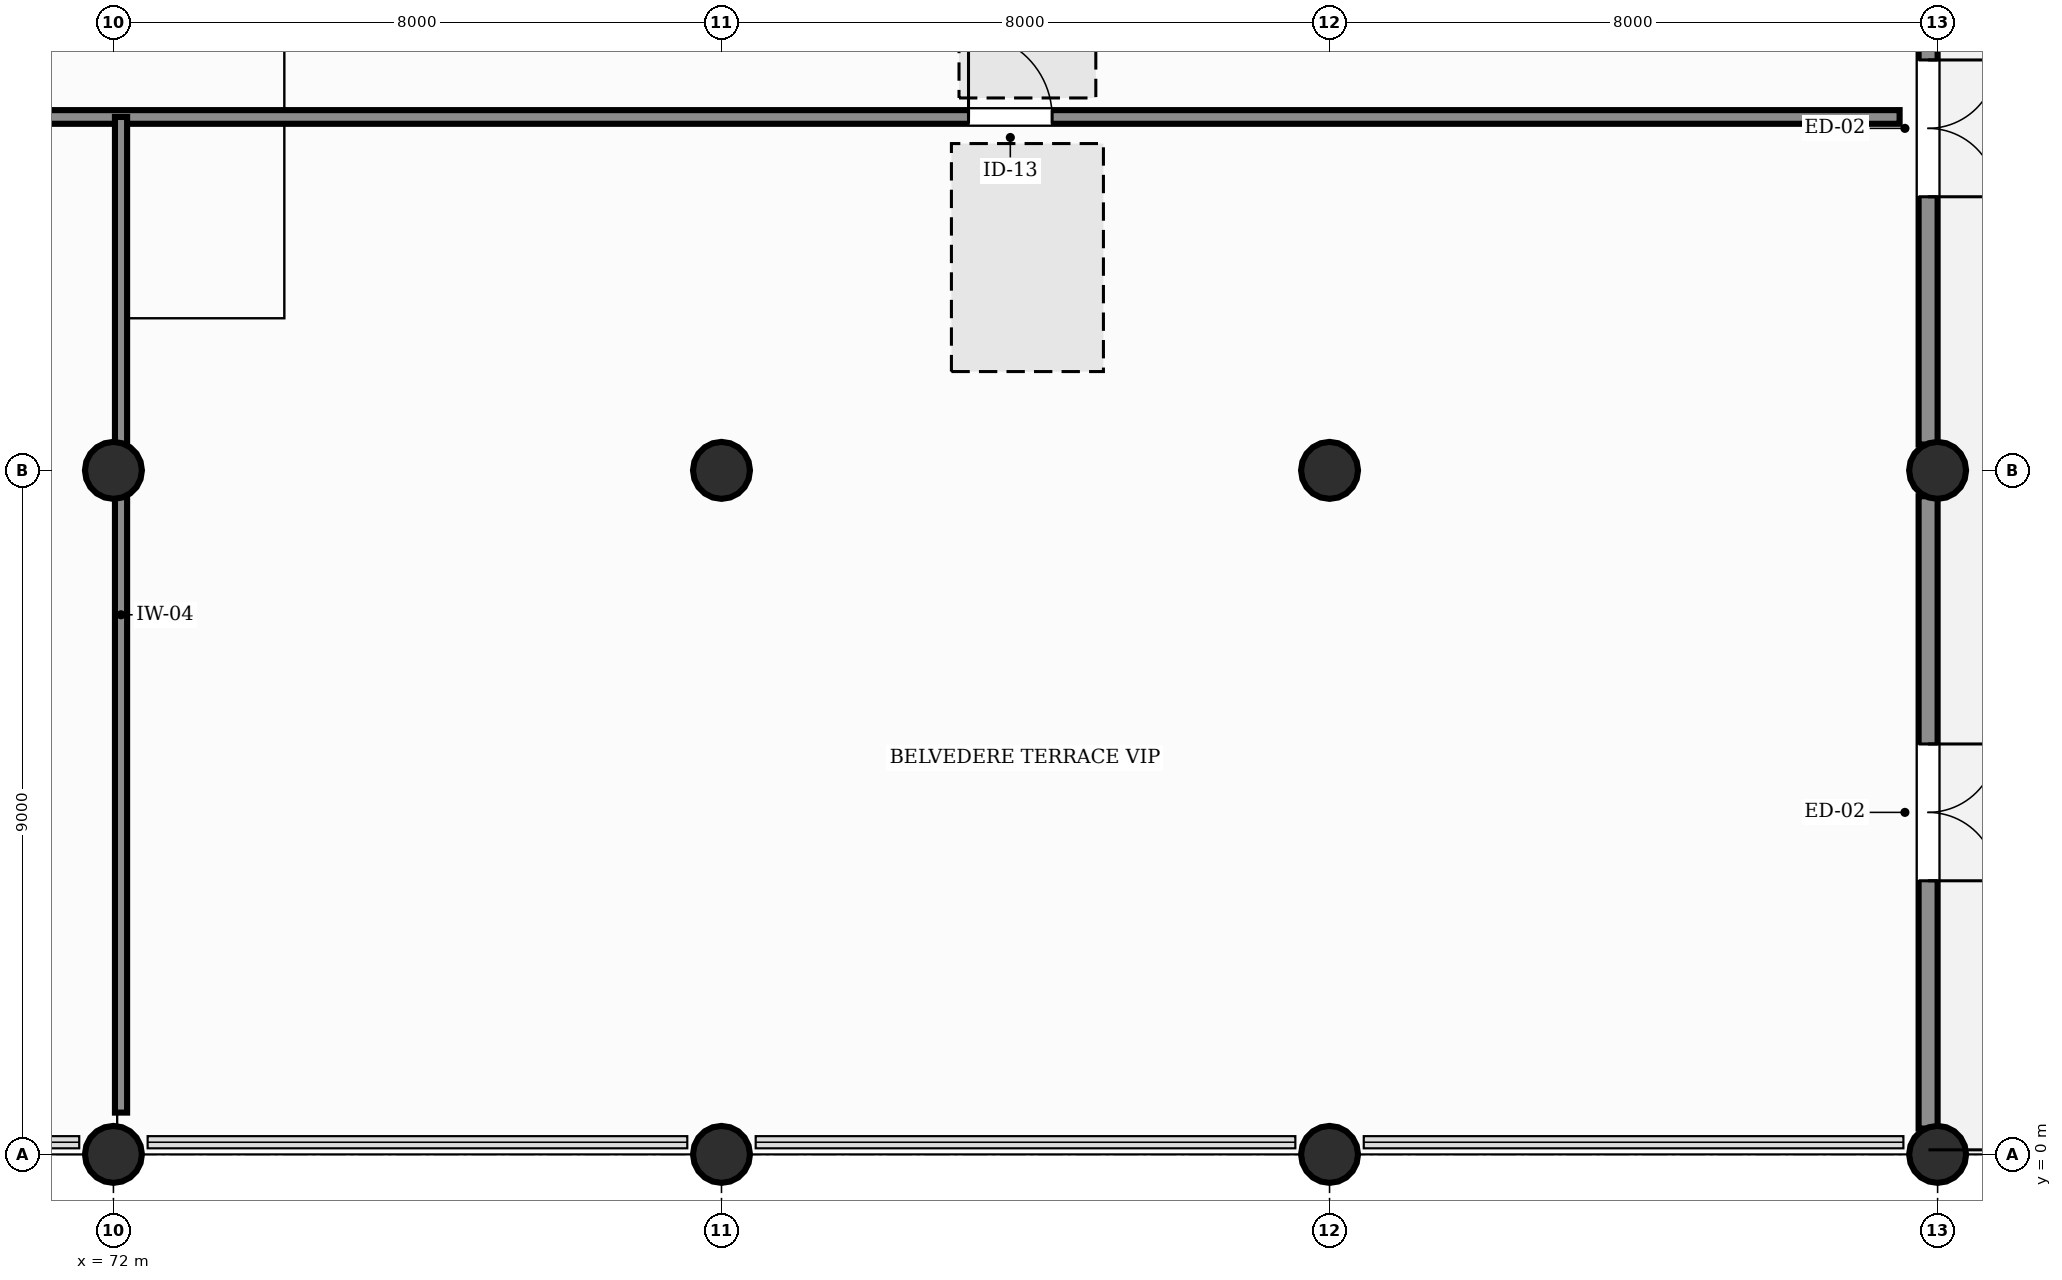
"""IFC4 building model, lengths in metres.
Left out: names, types, materials, properties, quantities, classifications, styles, units other than length and angle.
Written with IfcOpenShell. Run it as: python <this file> out.ifc"""

import sys

from ifc_helpers import new_model, si_unit, direction, frame, frame_2d, origin, origin_2d, place, context, subcontext, project, spatial, rectangle, circle, extrude, element, fill, save


model = new_model("IFC4")
c1 = context("Model", 3, precision=1e-05, world=origin(), true_north=direction((0.0, 1.0)))
c2 = subcontext(c1, "Body", "Model", "MODEL_VIEW")
j1 = project(units=[si_unit("LENGTHUNIT", "METRE"), si_unit("PLANEANGLEUNIT", "RADIAN")], contexts=[c1])
p1 = place(None, origin())
s1 = spatial("IfcSite", under=j1, at=p1, CompositionType="ELEMENT")
p2 = place(p1, origin())
s2 = spatial("IfcBuilding", under=s1, at=p2, CompositionType="ELEMENT")
p3 = place(p2, frame((0.0, 0.0, 21.0)))
s3 = spatial("IfcBuildingStorey", under=s2, at=p3, CompositionType="ELEMENT", Elevation=21.0)
for number, where, z_axis, x_axis in (
    (1, (72.0, 0.0, 0.0), (0.0, 0.0, 1.0), (1.0, 0.0, 0.0)),
    (2, (72.0, 9.0, 0.0), (0.0, 0.0, 1.0), (1.0, 0.0, 0.0)),
    (3, (80.0, 0.0, 0.0), (0.0, 0.0, 1.0), (1.0, 0.0, 0.0)),
    (4, (80.0, 9.0, 0.0), (0.0, 0.0, 1.0), (1.0, 0.0, 0.0)),
    (5, (88.0, 0.0, 0.0), (0.0, 0.0, 1.0), (1.0, 0.0, 0.0)),
    (6, (88.0, 9.0, 0.0), (0.0, 0.0, 1.0), (1.0, 0.0, 0.0)),
    (7, (96.0, 0.0, 0.0), (0.0, 0.0, 1.0), (1.0, 0.0, 0.0)),
    (8, (96.0, 9.0, 0.0), (0.0, 0.0, 1.0), (1.0, 0.0, 0.0)),
):
    element("IfcColumn", number, at=place(p3, frame(where, z_axis=z_axis, x_axis=x_axis)), inside=s3, PredefinedType="COLUMN", context=c2, shape_type="SweptSolid", body=[
        extrude(circle(Radius=0.375, at=origin_2d()), origin(), (0.0, 0.0, 1.0), 4.8),
    ])
p4 = place(p3, frame((95.875, 0.34, 0.0), z_axis=(0.0, 0.0, 1.0), x_axis=(0.0, 1.0, 0.0)))
e9 = element("IfcWall", 9, at=p4, inside=s3, PredefinedType="SOLIDWALL", context=c2, shape_type="SweptSolid", body=[
    extrude(rectangle(XDim=8.32, YDim=0.25, at=frame_2d((4.16, 0.0))), origin(), (0.0, 0.0, 1.0), 3.68),
])
p5 = place(p4, frame((3.26, 0.0, 0.0)))
e10 = element("IfcOpeningElement", 10, at=p5, cuts=e9, PredefinedType="OPENING", context=c2, shape_type="SweptSolid", body=[
    extrude(rectangle(XDim=1.8, YDim=2.4, at=frame_2d((0.9, 1.2))), frame((0.0, 0.135, 0.0), z_axis=(0.0, -1.0, 0.0), x_axis=(1.0, 0.0, 0.0)), (0.0, 0.0, 1.0), 0.27),
])
p6 = place(p3, frame((95.875, 9.34, 0.0), z_axis=(0.0, 0.0, 1.0), x_axis=(0.0, 1.0, 0.0)))
e11 = element("IfcWall", 11, at=p6, inside=s3, PredefinedType="SOLIDWALL", context=c2, shape_type="SweptSolid", body=[
    extrude(rectangle(XDim=8.32, YDim=0.25, at=frame_2d((4.16, 0.0))), origin(), (0.0, 0.0, 1.0), 3.68),
])
p7 = place(p6, frame((3.26, 0.0, 0.0)))
e12 = element("IfcOpeningElement", 12, at=p7, cuts=e11, PredefinedType="OPENING", context=c2, shape_type="SweptSolid", body=[
    extrude(rectangle(XDim=1.8, YDim=2.4, at=frame_2d((0.9, 1.2))), frame((0.0, 0.135, 0.0), z_axis=(0.0, -1.0, 0.0), x_axis=(1.0, 0.0, 0.0)), (0.0, 0.0, 1.0), 0.27),
])
p8 = place(p3, frame((0.6, 13.65, 0.0), z_axis=(0.0, 0.0, 1.0), x_axis=(1.0, 0.0, 0.0)))
e13 = element("IfcWall", 13, at=p8, inside=s3, PredefinedType="PARTITIONING", context=c2, shape_type="SweptSolid", body=[
    extrude(rectangle(XDim=94.9, YDim=0.18, at=frame_2d((47.45, 0.0))), origin(), (0.0, 0.0, 1.0), 3.6),
])
p9 = place(p8, frame((8.2, 0.0, 0.0)))
e14 = element("IfcOpeningElement", 14, at=p9, cuts=e13, PredefinedType="OPENING", context=c2, shape_type="SweptSolid", body=[
    extrude(rectangle(XDim=1.1, YDim=2.45, at=frame_2d((0.55, 1.225))), frame((0.0, 0.1, 0.0), z_axis=(0.0, -1.0, 0.0), x_axis=(1.0, 0.0, 0.0)), (0.0, 0.0, 1.0), 0.2),
])
p10 = place(p8, frame((25.95, 0.0, 0.0)))
e15 = element("IfcOpeningElement", 15, at=p10, cuts=e13, PredefinedType="OPENING", context=c2, shape_type="SweptSolid", body=[
    extrude(rectangle(XDim=1.85, YDim=2.45, at=frame_2d((0.925, 1.225))), frame((0.0, 0.1, 0.0), z_axis=(0.0, -1.0, 0.0), x_axis=(1.0, 0.0, 0.0)), (0.0, 0.0, 1.0), 0.2),
])
p11 = place(p8, frame((43.95, 0.0, 0.0)))
e16 = element("IfcOpeningElement", 16, at=p11, cuts=e13, PredefinedType="OPENING", context=c2, shape_type="SweptSolid", body=[
    extrude(rectangle(XDim=1.1, YDim=2.45, at=frame_2d((0.55, 1.225))), frame((0.0, 0.1, 0.0), z_axis=(0.0, -1.0, 0.0), x_axis=(1.0, 0.0, 0.0)), (0.0, 0.0, 1.0), 0.2),
])
p12 = place(p8, frame((61.95, 0.0, 0.0)))
e17 = element("IfcOpeningElement", 17, at=p12, cuts=e13, PredefinedType="OPENING", context=c2, shape_type="SweptSolid", body=[
    extrude(rectangle(XDim=1.85, YDim=2.45, at=frame_2d((0.925, 1.225))), frame((0.0, 0.1, 0.0), z_axis=(0.0, -1.0, 0.0), x_axis=(1.0, 0.0, 0.0)), (0.0, 0.0, 1.0), 0.2),
])
p13 = place(p8, frame((82.65, 0.0, 0.0)))
e18 = element("IfcOpeningElement", 18, at=p13, cuts=e13, PredefinedType="OPENING", context=c2, shape_type="SweptSolid", body=[
    extrude(rectangle(XDim=1.1, YDim=2.45, at=frame_2d((0.55, 1.225))), frame((0.0, 0.1, 0.0), z_axis=(0.0, -1.0, 0.0), x_axis=(1.0, 0.0, 0.0)), (0.0, 0.0, 1.0), 0.2),
])
p14 = place(p3, frame((72.1, 0.55, 0.0), z_axis=(0.0, 0.0, 1.0), x_axis=(0.0, 1.0, 0.0)))
e19 = element("IfcWall", 19, at=p14, inside=s3, PredefinedType="PARTITIONING", context=c2, shape_type="SweptSolid", body=[
    extrude(rectangle(XDim=13.1, YDim=0.16, at=frame_2d((6.55, 0.0))), origin(), (0.0, 0.0, 1.0), 3.6),
])
p15 = place(p5, frame((1.8, 0.0, 0.0), z_axis=(0.0, 0.0, 1.0), x_axis=(-1.0, 0.0, 0.0)))
e20 = element("IfcDoor", 20, at=p15, inside=s3, OperationType="DOUBLE_DOOR_SINGLE_SWING", PredefinedType="DOOR", context=c2, shape_type="SweptSolid", body=[
    extrude(rectangle(XDim=1.8, YDim=2.4, at=frame_2d((0.9, 1.2))), frame((0.0, 0.025, 0.0), z_axis=(0.0, -1.0, 0.0), x_axis=(1.0, 0.0, 0.0)), (0.0, 0.0, 1.0), 0.05),
])
fill(e10, e20)
p16 = place(p7, frame((1.8, 0.0, 0.0), z_axis=(0.0, 0.0, 1.0), x_axis=(-1.0, 0.0, 0.0)))
e21 = element("IfcDoor", 21, at=p16, inside=s3, OperationType="DOUBLE_DOOR_SINGLE_SWING", PredefinedType="DOOR", context=c2, shape_type="SweptSolid", body=[
    extrude(rectangle(XDim=1.8, YDim=2.4, at=frame_2d((0.9, 1.2))), frame((0.0, 0.025, 0.0), z_axis=(0.0, -1.0, 0.0), x_axis=(1.0, 0.0, 0.0)), (0.0, 0.0, 1.0), 0.05),
])
fill(e12, e21)
p17 = place(p2, frame((0.0, 0.0, 25.8)))
p18 = place(p17, frame((0.0, 0.0, -0.16)))
p19 = place(p18, frame((84.025, 11.8, 0.0)))
p20 = place(p19, frame((0.0, 0.0, 0.11)))
e22 = element("IfcWindow", 22, at=p20, inside=s3, PartitioningType="SINGLE_PANEL", PredefinedType="SKYLIGHT", context=c2, shape_type="SweptSolid", body=[
    extrude(rectangle(XDim=2.0, YDim=3.0, at=origin_2d()), origin(), (0.0, 0.0, 1.0), 0.05),
])
p21 = place(p18, frame((84.025, 15.2, 0.0)))
p22 = place(p21, frame((0.0, 0.0, 0.11)))
e23 = element("IfcWindow", 23, at=p22, inside=s3, PartitioningType="SINGLE_PANEL", PredefinedType="SKYLIGHT", context=c2, shape_type="SweptSolid", body=[
    extrude(rectangle(XDim=1.8, YDim=2.6, at=origin_2d()), origin(), (0.0, 0.0, 1.0), 0.05),
])
p23 = place(p13, origin())
e24 = element("IfcDoor", 24, at=p23, inside=s3, OperationType="SINGLE_SWING_LEFT", PredefinedType="DOOR", context=c2, shape_type="SweptSolid", body=[
    extrude(rectangle(XDim=1.1, YDim=2.45, at=frame_2d((0.55, 1.225))), frame((0.0, 0.025, 0.0), z_axis=(0.0, -1.0, 0.0), x_axis=(1.0, 0.0, 0.0)), (0.0, 0.0, 1.0), 0.05),
])
fill(e18, e24)
save(model, sys.argv[1])
